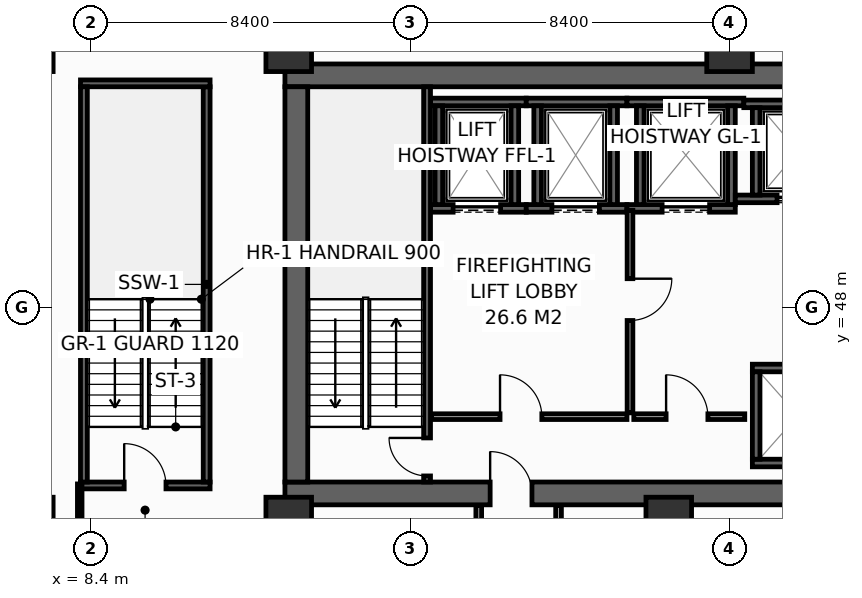
"""IFC4 building model, lengths in metres.
Left out: names, types, materials, properties, quantities, classifications, styles, units other than length and angle.
Written with IfcOpenShell. Run it as: python <this file> out.ifc"""

import sys

from ifc_helpers import new_model, si_unit, direction, frame, frame_2d, origin, origin_2d, place, context, subcontext, project, spatial, rectangle, hollow_rectangle, extrude, element, fill, save


model = new_model("IFC4")
c1 = context("Model", 3, precision=1e-05, world=origin(), true_north=direction((0.0, 1.0)))
c2 = subcontext(c1, "Body", "Model", "MODEL_VIEW")
j1 = project(units=[si_unit("LENGTHUNIT", "METRE"), si_unit("PLANEANGLEUNIT", "RADIAN")], contexts=[c1])
p1 = place(None, origin())
s1 = spatial("IfcSite", under=j1, at=p1, CompositionType="ELEMENT")
p2 = place(p1, origin())
s2 = spatial("IfcBuilding", under=s1, at=p2, CompositionType="ELEMENT")
p3 = place(p2, frame((0.0, 0.0, 78.0)))
s3 = spatial("IfcBuildingStorey", under=s2, at=p3, CompositionType="ELEMENT", Elevation=78.0)
p4 = place(p3, frame((13.5, 43.1, 0.0), z_axis=(0.0, 0.0, 1.0), x_axis=(1.0, 0.0, 0.0)))
e1 = element("IfcWall", 1, at=p4, inside=s3, PredefinedType="SHEAR", context=c2, shape_type="SweptSolid", body=[
    extrude(rectangle(XDim=32.9, YDim=0.6, at=frame_2d((16.45, 0.0))), origin(), (0.0, 0.0, 1.0), 4.15),
])
p5 = place(p4, frame((5.4, 0.0, 0.0)))
e2 = element("IfcOpeningElement", 2, at=p5, cuts=e1, PredefinedType="OPENING", context=c2, shape_type="SweptSolid", body=[
    extrude(rectangle(XDim=1.1, YDim=2.15, at=frame_2d((0.55, 1.075))), frame((0.0, 0.31, 0.0), z_axis=(0.0, -1.0, 0.0), x_axis=(1.0, 0.0, 0.0)), (0.0, 0.0, 1.0), 0.62),
])
p6 = place(p4, frame((25.6, 0.0, 0.0)))
e3 = element("IfcOpeningElement", 3, at=p6, cuts=e1, PredefinedType="OPENING", context=c2, shape_type="SweptSolid", body=[
    extrude(rectangle(XDim=1.1, YDim=2.15, at=frame_2d((0.55, 1.075))), frame((0.0, 0.31, 0.0), z_axis=(0.0, -1.0, 0.0), x_axis=(1.0, 0.0, 0.0)), (0.0, 0.0, 1.0), 0.62),
])
p7 = place(p3, frame((13.5, 54.1, 0.0), z_axis=(0.0, 0.0, 1.0), x_axis=(1.0, 0.0, 0.0)))
e4 = element("IfcWall", 4, at=p7, inside=s3, PredefinedType="SHEAR", context=c2, shape_type="SweptSolid", body=[
    extrude(rectangle(XDim=32.9, YDim=0.6, at=frame_2d((16.45, 0.0))), origin(), (0.0, 0.0, 1.0), 4.15),
])
p8 = place(p3, frame((13.8, 43.4, 0.0), z_axis=(0.0, 0.0, 1.0), x_axis=(0.0, 1.0, 0.0)))
e5 = element("IfcWall", 5, at=p8, inside=s3, PredefinedType="SHEAR", context=c2, shape_type="SweptSolid", body=[
    extrude(rectangle(XDim=10.4, YDim=0.6, at=frame_2d((5.2, 0.0))), origin(), (0.0, 0.0, 1.0), 4.15),
])
for number, where, z_axis, x_axis in (
    (6, (6.8, 54.8, 0.0), (0.0, 0.0, 1.0), (1.0, 0.0, 0.0)),
    (7, (13.6, 54.8, 0.0), (0.0, 0.0, 1.0), (1.0, 0.0, 0.0)),
    (8, (25.2, 54.8, 0.0), (0.0, 0.0, 1.0), (1.0, 0.0, 0.0)),
    (9, (6.8, 42.4, 0.0), (0.0, 0.0, 1.0), (1.0, 0.0, 0.0)),
    (10, (13.6, 42.4, 0.0), (0.0, 0.0, 1.0), (1.0, 0.0, 0.0)),
    (11, (23.6, 42.4, 0.0), (0.0, 0.0, 1.0), (1.0, 0.0, 0.0)),
):
    element("IfcColumn", number, at=place(p3, frame(where, z_axis=z_axis, x_axis=x_axis)), inside=s3, PredefinedType="COLUMN", context=c2, shape_type="SweptSolid", body=[
        extrude(hollow_rectangle(XDim=1.2, YDim=1.2, WallThickness=0.055, at=origin_2d()), origin(), (0.0, 0.0, 1.0), 4.4),
    ])
p9 = place(p3, frame((17.33, 50.6, 0.0), z_axis=(0.0, 0.0, 1.0), x_axis=(1.0, 0.0, 0.0)))
e12 = element("IfcWall", 12, at=p9, inside=s3, PredefinedType="SHEAR", context=c2, shape_type="SweptSolid", body=[
    extrude(rectangle(XDim=2.52, YDim=0.2, at=frame_2d((1.26, 0.0))), origin(), (0.0, 0.0, 1.0), 4.15),
])
p10 = place(p9, frame((0.595, 0.0, 0.0)))
e13 = element("IfcOpeningElement", 13, at=p10, cuts=e12, PredefinedType="OPENING", context=c2, shape_type="SweptSolid", body=[
    extrude(rectangle(XDim=1.25, YDim=2.3, at=frame_2d((0.625, 1.15))), frame((0.0, 0.11, 0.0), z_axis=(0.0, -1.0, 0.0), x_axis=(1.0, 0.0, 0.0)), (0.0, 0.0, 1.0), 0.22),
])
p11 = place(p3, frame((17.33, 53.4, 0.0), z_axis=(0.0, 0.0, 1.0), x_axis=(1.0, 0.0, 0.0)))
e14 = element("IfcWall", 14, at=p11, inside=s3, PredefinedType="SHEAR", context=c2, shape_type="SweptSolid", body=[
    extrude(rectangle(XDim=2.52, YDim=0.2, at=frame_2d((1.26, 0.0))), origin(), (0.0, 0.0, 1.0), 4.15),
])
for number, where, z_axis, x_axis in (
    (15, (17.55, 50.7, 0.0), (0.0, 0.0, 1.0), (0.0, 1.0, 0.0)),
    (16, (19.55, 50.7, 0.0), (0.0, 0.0, 1.0), (0.0, 1.0, 0.0)),
):
    element("IfcWall", number, at=place(p3, frame(where, z_axis=z_axis, x_axis=x_axis)), inside=s3, PredefinedType="SHEAR", context=c2, shape_type="SweptSolid", body=[
        extrude(rectangle(XDim=2.6, YDim=0.2, at=frame_2d((1.3, 0.0))), origin(), (0.0, 0.0, 1.0), 4.15),
    ])
p12 = place(p3, frame((19.85, 50.6, 0.0), z_axis=(0.0, 0.0, 1.0), x_axis=(1.0, 0.0, 0.0)))
e17 = element("IfcWall", 17, at=p12, inside=s3, PredefinedType="SHEAR", context=c2, shape_type="SweptSolid", body=[
    extrude(rectangle(XDim=2.65, YDim=0.2, at=frame_2d((1.325, 0.0))), origin(), (0.0, 0.0, 1.0), 4.15),
])
p13 = place(p12, frame((0.675, 0.0, 0.0)))
e18 = element("IfcOpeningElement", 18, at=p13, cuts=e17, PredefinedType="OPENING", context=c2, shape_type="SweptSolid", body=[
    extrude(rectangle(XDim=1.25, YDim=2.3, at=frame_2d((0.625, 1.15))), frame((0.0, 0.11, 0.0), z_axis=(0.0, -1.0, 0.0), x_axis=(1.0, 0.0, 0.0)), (0.0, 0.0, 1.0), 0.22),
])
p14 = place(p3, frame((19.85, 53.4, 0.0), z_axis=(0.0, 0.0, 1.0), x_axis=(1.0, 0.0, 0.0)))
e19 = element("IfcWall", 19, at=p14, inside=s3, PredefinedType="SHEAR", context=c2, shape_type="SweptSolid", body=[
    extrude(rectangle(XDim=2.65, YDim=0.2, at=frame_2d((1.325, 0.0))), origin(), (0.0, 0.0, 1.0), 4.15),
])
for number, where, z_axis, x_axis in (
    (20, (20.15, 50.7, 0.0), (0.0, 0.0, 1.0), (0.0, 1.0, 0.0)),
    (21, (22.15, 50.7, 0.0), (0.0, 0.0, 1.0), (0.0, 1.0, 0.0)),
):
    element("IfcWall", number, at=place(p3, frame(where, z_axis=z_axis, x_axis=x_axis)), inside=s3, PredefinedType="SHEAR", context=c2, shape_type="SweptSolid", body=[
        extrude(rectangle(XDim=2.6, YDim=0.2, at=frame_2d((1.3, 0.0))), origin(), (0.0, 0.0, 1.0), 4.15),
    ])
p15 = place(p3, frame((22.5, 50.6, 0.0), z_axis=(0.0, 0.0, 1.0), x_axis=(1.0, 0.0, 0.0)))
e22 = element("IfcWall", 22, at=p15, inside=s3, PredefinedType="SHEAR", context=c2, shape_type="SweptSolid", body=[
    extrude(rectangle(XDim=2.85, YDim=0.2, at=frame_2d((1.425, 0.0))), origin(), (0.0, 0.0, 1.0), 4.15),
])
p16 = place(p15, frame((0.925, 0.0, 0.0)))
e23 = element("IfcOpeningElement", 23, at=p16, cuts=e22, PredefinedType="OPENING", context=c2, shape_type="SweptSolid", body=[
    extrude(rectangle(XDim=1.25, YDim=2.3, at=frame_2d((0.625, 1.15))), frame((0.0, 0.11, 0.0), z_axis=(0.0, -1.0, 0.0), x_axis=(1.0, 0.0, 0.0)), (0.0, 0.0, 1.0), 0.22),
])
p17 = place(p3, frame((22.5, 53.4, 0.0), z_axis=(0.0, 0.0, 1.0), x_axis=(1.0, 0.0, 0.0)))
e24 = element("IfcWall", 24, at=p17, inside=s3, PredefinedType="SHEAR", context=c2, shape_type="SweptSolid", body=[
    extrude(rectangle(XDim=3.075, YDim=0.2, at=frame_2d((1.538, 0.0))), origin(), (0.0, 0.0, 1.0), 4.15),
])
for number, where, z_axis, x_axis in (
    (25, (22.85, 50.7, 0.0), (0.0, 0.0, 1.0), (0.0, 1.0, 0.0)),
    (26, (25.25, 50.7, 0.0), (0.0, 0.0, 1.0), (0.0, 1.0, 0.0)),
):
    element("IfcWall", number, at=place(p3, frame(where, z_axis=z_axis, x_axis=x_axis)), inside=s3, PredefinedType="SHEAR", context=c2, shape_type="SweptSolid", body=[
        extrude(rectangle(XDim=2.6, YDim=0.2, at=frame_2d((1.3, 0.0))), origin(), (0.0, 0.0, 1.0), 4.15),
    ])
p18 = place(p3, frame((25.35, 50.85, 0.0), z_axis=(0.0, 0.0, 1.0), x_axis=(1.0, 0.0, 0.0)))
e27 = element("IfcWall", 27, at=p18, inside=s3, PredefinedType="SHEAR", context=c2, shape_type="SweptSolid", body=[
    extrude(rectangle(XDim=3.025, YDim=0.2, at=frame_2d((1.512, 0.0))), origin(), (0.0, 0.0, 1.0), 4.15),
])
p19 = place(p18, frame((1.1, 0.0, 0.0)))
e28 = element("IfcOpeningElement", 28, at=p19, cuts=e27, PredefinedType="OPENING", context=c2, shape_type="SweptSolid", body=[
    extrude(rectangle(XDim=1.1, YDim=2.2, at=frame_2d((0.55, 1.1))), frame((0.0, 0.11, 0.0), z_axis=(0.0, -1.0, 0.0), x_axis=(1.0, 0.0, 0.0)), (0.0, 0.0, 1.0), 0.22),
])
p20 = place(p3, frame((25.575, 53.35, 0.0), z_axis=(0.0, 0.0, 1.0), x_axis=(1.0, 0.0, 0.0)))
e29 = element("IfcWall", 29, at=p20, inside=s3, PredefinedType="SHEAR", context=c2, shape_type="SweptSolid", body=[
    extrude(rectangle(XDim=2.8, YDim=0.2, at=frame_2d((1.4, 0.0))), origin(), (0.0, 0.0, 1.0), 4.15),
])
p21 = place(p3, frame((25.9, 50.95, 0.0), z_axis=(0.0, 0.0, 1.0), x_axis=(0.0, 1.0, 0.0)))
e30 = element("IfcWall", 30, at=p21, inside=s3, PredefinedType="SHEAR", context=c2, shape_type="SweptSolid", body=[
    extrude(rectangle(XDim=2.3, YDim=0.2, at=frame_2d((1.15, 0.0))), origin(), (0.0, 0.0, 1.0), 4.15),
])
for number, where, z_axis, x_axis in (
    (31, (25.8, 43.9, 0.0), (0.0, 0.0, 1.0), (1.0, 0.0, 0.0)),
    (32, (25.8, 46.4, 0.0), (0.0, 0.0, 1.0), (1.0, 0.0, 0.0)),
):
    element("IfcWall", number, at=place(p3, frame(where, z_axis=z_axis, x_axis=x_axis)), inside=s3, PredefinedType="SHEAR", context=c2, shape_type="SweptSolid", body=[
        extrude(rectangle(XDim=2.575, YDim=0.2, at=frame_2d((1.288, 0.0))), origin(), (0.0, 0.0, 1.0), 4.15),
    ])
p22 = place(p3, frame((25.9, 44.0, 0.0), z_axis=(0.0, 0.0, 1.0), x_axis=(0.0, 1.0, 0.0)))
e33 = element("IfcWall", 33, at=p22, inside=s3, PredefinedType="SHEAR", context=c2, shape_type="SweptSolid", body=[
    extrude(rectangle(XDim=2.3, YDim=0.2, at=frame_2d((1.15, 0.0))), origin(), (0.0, 0.0, 1.0), 4.15),
])
p23 = place(p3, frame((17.24, 43.4, 0.0), z_axis=(0.0, 0.0, 1.0), x_axis=(0.0, 1.0, 0.0)))
e34 = element("IfcWall", 34, at=p23, inside=s3, PredefinedType="SHEAR", context=c2, shape_type="SweptSolid", body=[
    extrude(rectangle(XDim=10.4, YDim=0.18, at=frame_2d((5.2, 0.0))), origin(), (0.0, 0.0, 1.0), 4.15),
])
p24 = place(p23, frame((0.16, 0.0, 0.0)))
e35 = element("IfcOpeningElement", 35, at=p24, cuts=e34, PredefinedType="OPENING", context=c2, shape_type="SweptSolid", body=[
    extrude(rectangle(XDim=1.0, YDim=2.15, at=frame_2d((0.5, 1.075))), frame((0.0, 0.1, 0.0), z_axis=(0.0, -1.0, 0.0), x_axis=(1.0, 0.0, 0.0)), (0.0, 0.0, 1.0), 0.2),
])
p25 = place(p3, frame((8.12, 43.31, 0.0), z_axis=(0.0, 0.0, 1.0), x_axis=(1.0, 0.0, 0.0)))
e36 = element("IfcWall", 36, at=p25, inside=s3, PredefinedType="SHEAR", context=c2, shape_type="SweptSolid", body=[
    extrude(rectangle(XDim=3.41, YDim=0.18, at=frame_2d((1.705, 0.0))), origin(), (0.0, 0.0, 1.0), 4.15),
])
p26 = place(p25, frame((1.15, 0.0, 0.0)))
e37 = element("IfcOpeningElement", 37, at=p26, cuts=e36, PredefinedType="OPENING", context=c2, shape_type="SweptSolid", body=[
    extrude(rectangle(XDim=1.1, YDim=2.15, at=frame_2d((0.55, 1.075))), frame((0.0, 0.1, 0.0), z_axis=(0.0, -1.0, 0.0), x_axis=(1.0, 0.0, 0.0)), (0.0, 0.0, 1.0), 0.2),
])
p27 = place(p3, frame((11.44, 43.4, 0.0), z_axis=(0.0, 0.0, 1.0), x_axis=(0.0, 1.0, 0.0)))
e38 = element("IfcWall", 38, at=p27, inside=s3, PredefinedType="SHEAR", context=c2, shape_type="SweptSolid", body=[
    extrude(rectangle(XDim=10.4, YDim=0.18, at=frame_2d((5.2, 0.0))), origin(), (0.0, 0.0, 1.0), 4.15),
])
p28 = place(p3, frame((11.53, 53.89, 0.0), z_axis=(0.0, 0.0, 1.0), x_axis=(-1.0, 0.0, 0.0)))
e39 = element("IfcWall", 39, at=p28, inside=s3, PredefinedType="SHEAR", context=c2, shape_type="SweptSolid", body=[
    extrude(rectangle(XDim=3.41, YDim=0.18, at=frame_2d((1.705, 0.0))), origin(), (0.0, 0.0, 1.0), 4.15),
])
p29 = place(p3, frame((8.21, 53.8, 0.0), z_axis=(0.0, 0.0, 1.0), x_axis=(0.0, -1.0, 0.0)))
e40 = element("IfcWall", 40, at=p29, inside=s3, PredefinedType="SHEAR", context=c2, shape_type="SweptSolid", body=[
    extrude(rectangle(XDim=10.4, YDim=0.18, at=frame_2d((5.2, 0.0))), origin(), (0.0, 0.0, 1.0), 4.15),
])
p30 = place(p3, frame((17.36, 45.12, 0.0), z_axis=(0.0, 0.0, 1.0), x_axis=(1.0, 0.0, 0.0)))
e41 = element("IfcWall", 41, at=p30, inside=s3, PredefinedType="PARTITIONING", context=c2, shape_type="SweptSolid", body=[
    extrude(rectangle(XDim=5.14, YDim=0.15, at=frame_2d((2.57, 0.0))), origin(), (0.0, 0.0, 1.0), 4.15),
])
p31 = place(p30, frame((1.8, 0.0, 0.0)))
e42 = element("IfcOpeningElement", 42, at=p31, cuts=e41, PredefinedType="OPENING", context=c2, shape_type="SweptSolid", body=[
    extrude(rectangle(XDim=1.1, YDim=2.15, at=frame_2d((0.55, 1.075))), frame((0.0, 0.085, 0.0), z_axis=(0.0, -1.0, 0.0), x_axis=(1.0, 0.0, 0.0)), (0.0, 0.0, 1.0), 0.17),
])
p32 = place(p3, frame((22.58, 50.55, 0.0), z_axis=(0.0, 0.0, 1.0), x_axis=(0.0, -1.0, 0.0)))
e43 = element("IfcWall", 43, at=p32, inside=s3, PredefinedType="PARTITIONING", context=c2, shape_type="SweptSolid", body=[
    extrude(rectangle(XDim=5.33, YDim=0.15, at=frame_2d((2.665, 0.0))), origin(), (0.0, 0.0, 1.0), 4.15),
])
p33 = place(p32, frame((1.8, 0.0, 0.0)))
e44 = element("IfcOpeningElement", 44, at=p33, cuts=e43, PredefinedType="OPENING", context=c2, shape_type="SweptSolid", body=[
    extrude(rectangle(XDim=1.1, YDim=2.15, at=frame_2d((0.55, 1.075))), frame((0.0, 0.085, 0.0), z_axis=(0.0, -1.0, 0.0), x_axis=(1.0, 0.0, 0.0)), (0.0, 0.0, 1.0), 0.17),
])
p34 = place(p3, frame((22.68, 45.12, 0.0), z_axis=(0.0, 0.0, 1.0), x_axis=(1.0, 0.0, 0.0)))
e45 = element("IfcWall", 45, at=p34, inside=s3, PredefinedType="PARTITIONING", context=c2, shape_type="SweptSolid", body=[
    extrude(rectangle(XDim=2.92, YDim=0.15, at=frame_2d((1.46, 0.0))), origin(), (0.0, 0.0, 1.0), 4.15),
])
p35 = place(p34, frame((0.85, 0.0, 0.0)))
e46 = element("IfcOpeningElement", 46, at=p35, cuts=e45, PredefinedType="OPENING", context=c2, shape_type="SweptSolid", body=[
    extrude(rectangle(XDim=1.1, YDim=2.15, at=frame_2d((0.55, 1.075))), frame((0.0, 0.085, 0.0), z_axis=(0.0, -1.0, 0.0), x_axis=(1.0, 0.0, 0.0)), (0.0, 0.0, 1.0), 0.17),
])
p36 = place(p3, frame((13.8, 40.83, 0.0), z_axis=(0.0, 0.0, 1.0), x_axis=(0.0, 1.0, 0.0)))
e47 = element("IfcWall", 47, at=p36, inside=s3, PredefinedType="PARTITIONING", context=c2, shape_type="SweptSolid", body=[
    extrude(rectangle(XDim=1.95, YDim=0.12, at=frame_2d((0.975, 0.0))), origin(), (0.0, 0.0, 1.0), 4.15),
])
p37 = place(p3, frame((8.1, 40.75, 0.0), z_axis=(0.0, 0.0, 1.0), x_axis=(0.0, 1.0, 0.0)))
e48 = element("IfcWall", 48, at=p37, inside=s3, PredefinedType="PARTITIONING", context=c2, shape_type="SweptSolid", body=[
    extrude(rectangle(XDim=2.6, YDim=0.12, at=frame_2d((1.3, 0.0))), origin(), (0.0, 0.0, 1.0), 3.335),
])
for number, where, z_axis, x_axis in (
    (49, (18.6, 40.75, 0.0), (0.0, 0.0, 1.0), (0.0, 1.0, 0.0)),
    (50, (20.7, 40.75, 0.0), (0.0, 0.0, 1.0), (0.0, 1.0, 0.0)),
):
    element("IfcWall", number, at=place(p3, frame(where, z_axis=z_axis, x_axis=x_axis)), inside=s3, PredefinedType="PARTITIONING", context=c2, shape_type="SweptSolid", body=[
        extrude(rectangle(XDim=2.03, YDim=0.15, at=frame_2d((1.015, 0.0))), origin(), (0.0, 0.0, 1.0), 4.15),
    ])
p38 = place(p10, origin())
e51 = element("IfcDoor", 51, at=p38, inside=s3, OperationType="SLIDING_TO_LEFT", PredefinedType="DOOR", context=c2, shape_type="SweptSolid", body=[
    extrude(rectangle(XDim=1.25, YDim=2.3, at=frame_2d((0.625, 1.15))), frame((0.0, 0.025, 0.0), z_axis=(0.0, -1.0, 0.0), x_axis=(1.0, 0.0, 0.0)), (0.0, 0.0, 1.0), 0.05),
])
fill(e13, e51)
p39 = place(p13, origin())
e52 = element("IfcDoor", 52, at=p39, inside=s3, OperationType="SLIDING_TO_LEFT", PredefinedType="DOOR", context=c2, shape_type="SweptSolid", body=[
    extrude(rectangle(XDim=1.25, YDim=2.3, at=frame_2d((0.625, 1.15))), frame((0.0, 0.025, 0.0), z_axis=(0.0, -1.0, 0.0), x_axis=(1.0, 0.0, 0.0)), (0.0, 0.0, 1.0), 0.05),
])
fill(e18, e52)
p40 = place(p16, origin())
e53 = element("IfcDoor", 53, at=p40, inside=s3, OperationType="SLIDING_TO_LEFT", PredefinedType="DOOR", context=c2, shape_type="SweptSolid", body=[
    extrude(rectangle(XDim=1.25, YDim=2.3, at=frame_2d((0.625, 1.15))), frame((0.0, 0.025, 0.0), z_axis=(0.0, -1.0, 0.0), x_axis=(1.0, 0.0, 0.0)), (0.0, 0.0, 1.0), 0.05),
])
fill(e23, e53)
p41 = place(p19, origin())
e54 = element("IfcDoor", 54, at=p41, inside=s3, OperationType="SLIDING_TO_LEFT", PredefinedType="DOOR", context=c2, shape_type="SweptSolid", body=[
    extrude(rectangle(XDim=1.1, YDim=2.2, at=frame_2d((0.55, 1.1))), frame((0.0, 0.025, 0.0), z_axis=(0.0, -1.0, 0.0), x_axis=(1.0, 0.0, 0.0)), (0.0, 0.0, 1.0), 0.05),
])
fill(e28, e54)
p42 = place(p24, origin())
e55 = element("IfcDoor", 55, at=p42, inside=s3, OperationType="SINGLE_SWING_RIGHT", PredefinedType="DOOR", context=c2, shape_type="SweptSolid", body=[
    extrude(rectangle(XDim=1.0, YDim=2.15, at=frame_2d((0.5, 1.075))), frame((0.0, 0.025, 0.0), z_axis=(0.0, -1.0, 0.0), x_axis=(1.0, 0.0, 0.0)), (0.0, 0.0, 1.0), 0.05),
])
fill(e35, e55)
p43 = place(p26, origin())
e56 = element("IfcDoor", 56, at=p43, inside=s3, OperationType="SINGLE_SWING_LEFT", PredefinedType="DOOR", context=c2, shape_type="SweptSolid", body=[
    extrude(rectangle(XDim=1.1, YDim=2.15, at=frame_2d((0.55, 1.075))), frame((0.0, 0.025, 0.0), z_axis=(0.0, -1.0, 0.0), x_axis=(1.0, 0.0, 0.0)), (0.0, 0.0, 1.0), 0.05),
])
fill(e37, e56)
p44 = place(p31, origin())
e57 = element("IfcDoor", 57, at=p44, inside=s3, OperationType="SINGLE_SWING_LEFT", PredefinedType="DOOR", context=c2, shape_type="SweptSolid", body=[
    extrude(rectangle(XDim=1.1, YDim=2.15, at=frame_2d((0.55, 1.075))), frame((0.0, 0.025, 0.0), z_axis=(0.0, -1.0, 0.0), x_axis=(1.0, 0.0, 0.0)), (0.0, 0.0, 1.0), 0.05),
])
fill(e42, e57)
p45 = place(p33, origin())
e58 = element("IfcDoor", 58, at=p45, inside=s3, OperationType="SINGLE_SWING_LEFT", PredefinedType="DOOR", context=c2, shape_type="SweptSolid", body=[
    extrude(rectangle(XDim=1.1, YDim=2.15, at=frame_2d((0.55, 1.075))), frame((0.0, 0.025, 0.0), z_axis=(0.0, -1.0, 0.0), x_axis=(1.0, 0.0, 0.0)), (0.0, 0.0, 1.0), 0.05),
])
fill(e44, e58)
p46 = place(p35, origin())
e59 = element("IfcDoor", 59, at=p46, inside=s3, OperationType="SINGLE_SWING_LEFT", PredefinedType="DOOR", context=c2, shape_type="SweptSolid", body=[
    extrude(rectangle(XDim=1.1, YDim=2.15, at=frame_2d((0.55, 1.075))), frame((0.0, 0.025, 0.0), z_axis=(0.0, -1.0, 0.0), x_axis=(1.0, 0.0, 0.0)), (0.0, 0.0, 1.0), 0.05),
])
fill(e46, e59)
p47 = place(p5, origin())
e60 = element("IfcDoor", 60, at=p47, inside=s3, OperationType="SINGLE_SWING_LEFT", PredefinedType="DOOR", context=c2, shape_type="SweptSolid", body=[
    extrude(rectangle(XDim=1.1, YDim=2.15, at=frame_2d((0.55, 1.075))), frame((0.0, 0.025, 0.0), z_axis=(0.0, -1.0, 0.0), x_axis=(1.0, 0.0, 0.0)), (0.0, 0.0, 1.0), 0.05),
])
fill(e2, e60)
save(model, sys.argv[1])
